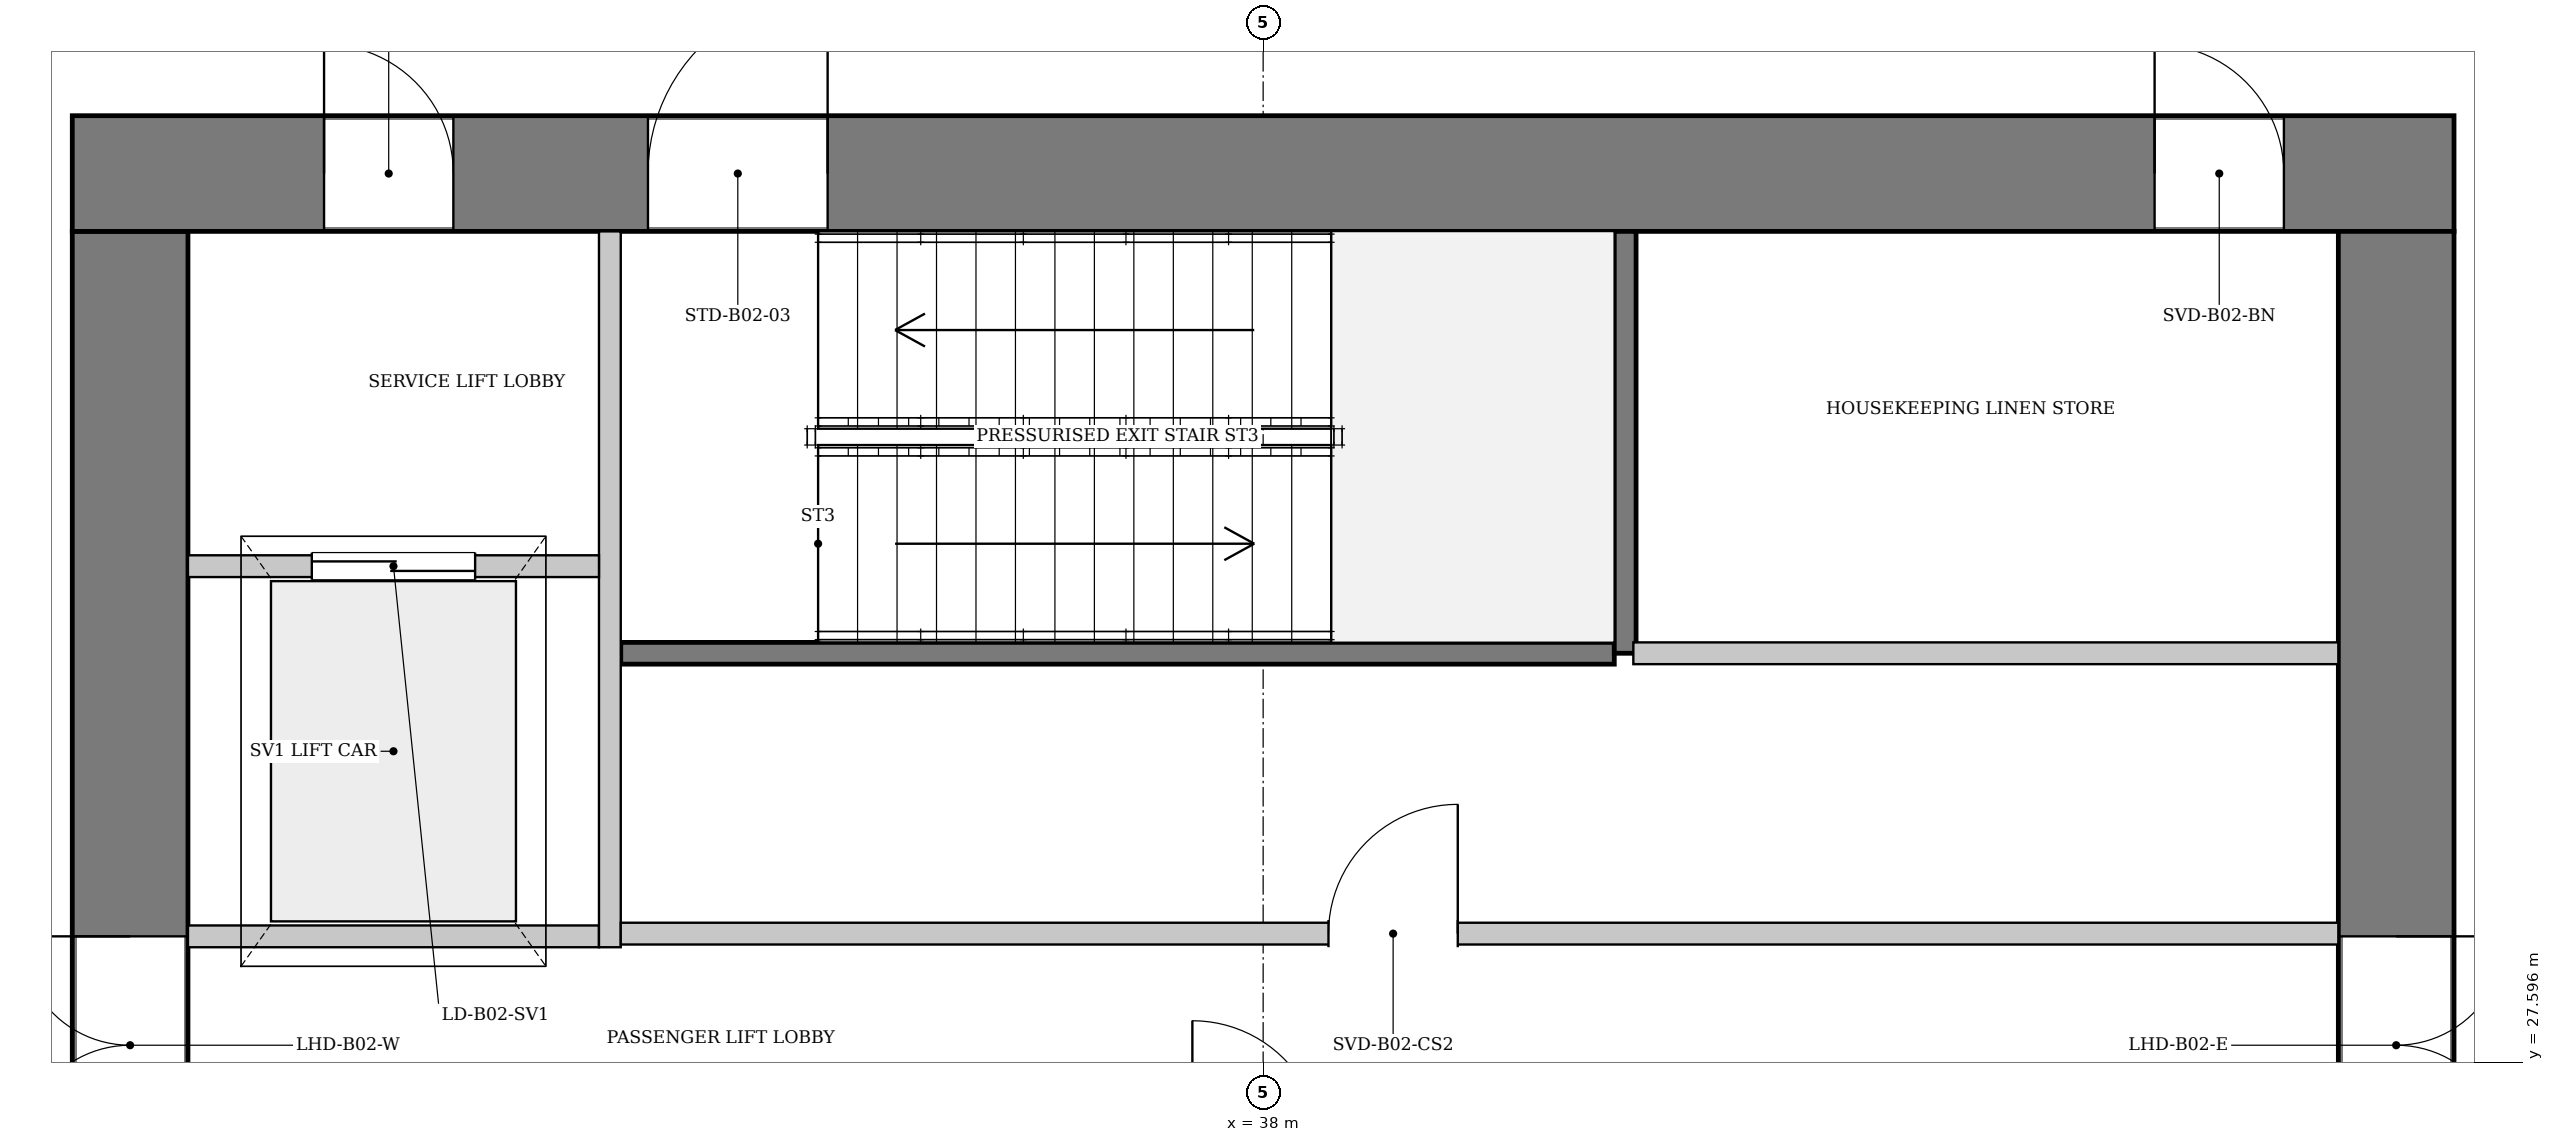
"""IFC4 building model, lengths in metres.
Left out: names, types, materials, properties, quantities, classifications, styles, units other than length and angle.
Written with IfcOpenShell. Run it as: python <this file> out.ifc"""

import sys

from ifc_helpers import new_model, si_unit, direction, frame, frame_2d, origin, place, context, subcontext, project, spatial, rectangle, extrude, source, transform, mapped, element, fill, save


model = new_model("IFC4")
c1 = context("Model", 3, precision=1e-05, world=origin(), true_north=direction((0.0, 1.0)))
c2 = subcontext(c1, "Body", "Model", "MODEL_VIEW")
j1 = project(units=[si_unit("LENGTHUNIT", "METRE"), si_unit("PLANEANGLEUNIT", "RADIAN")], contexts=[c1])
p1 = place(None, origin())
s1 = spatial("IfcSite", under=j1, at=p1, CompositionType="ELEMENT")
p2 = place(p1, origin())
s2 = spatial("IfcBuilding", under=s1, at=p2, CompositionType="ELEMENT")
p3 = place(p2, frame((0.0, 0.0, -9.6)))
s3 = spatial("IfcBuildingStorey", under=s2, at=p3, CompositionType="ELEMENT", Elevation=-9.6)
p4 = place(p3, frame((29.675, 19.5, 0.0), z_axis=(0.0, 0.0, 1.0), x_axis=(0.0, 1.0, 0.0)))
e1 = element("IfcWall", 1, at=p4, inside=s3, PredefinedType="SHEAR", context=c2, shape_type="SweptSolid", body=[
    extrude(rectangle(XDim=14.2, YDim=0.85, at=frame_2d((7.1, 0.0))), origin(), (0.0, 0.0, 1.0), 4.45),
])
p5 = place(p4, frame((7.42, 0.0, 0.0)))
e2 = element("IfcOpeningElement", 2, at=p5, cuts=e1, PredefinedType="OPENING", context=c2, shape_type="SweptSolid", body=[
    extrude(rectangle(XDim=1.6, YDim=2.2, at=frame_2d((0.8, 1.1))), frame((0.0, 0.435, 0.0), z_axis=(0.0, -1.0, 0.0), x_axis=(1.0, 0.0, 0.0)), (0.0, 0.0, 1.0), 0.87),
])
p6 = place(p3, frame((29.25, 34.125, 0.0), z_axis=(0.0, 0.0, 1.0), x_axis=(1.0, 0.0, 0.0)))
e3 = element("IfcWall", 3, at=p6, inside=s3, PredefinedType="SHEAR", context=c2, shape_type="SweptSolid", body=[
    extrude(rectangle(XDim=17.5, YDim=0.85, at=frame_2d((8.75, 0.0))), origin(), (0.0, 0.0, 1.0), 4.45),
])
p7 = place(p6, frame((1.85, 0.0, 0.0)))
e4 = element("IfcOpeningElement", 4, at=p7, cuts=e3, PredefinedType="OPENING", context=c2, shape_type="SweptSolid", body=[
    extrude(rectangle(XDim=0.95, YDim=2.1, at=frame_2d((0.475, 1.05))), frame((0.0, 0.435, 0.0), z_axis=(0.0, -1.0, 0.0), x_axis=(1.0, 0.0, 0.0)), (0.0, 0.0, 1.0), 0.87),
])
p8 = place(p6, frame((4.23, 0.0, 0.0)))
e5 = element("IfcOpeningElement", 5, at=p8, cuts=e3, PredefinedType="OPENING", context=c2, shape_type="SweptSolid", body=[
    extrude(rectangle(XDim=1.32, YDim=2.2, at=frame_2d((0.66, 1.1))), frame((0.0, 0.435, 0.0), z_axis=(0.0, -1.0, 0.0), x_axis=(1.0, 0.0, 0.0)), (0.0, 0.0, 1.0), 0.87),
])
p9 = place(p6, frame((15.3, 0.0, 0.0)))
e6 = element("IfcOpeningElement", 6, at=p9, cuts=e3, PredefinedType="OPENING", context=c2, shape_type="SweptSolid", body=[
    extrude(rectangle(XDim=0.95, YDim=2.1, at=frame_2d((0.475, 1.05))), frame((0.0, 0.435, 0.0), z_axis=(0.0, -1.0, 0.0), x_axis=(1.0, 0.0, 0.0)), (0.0, 0.0, 1.0), 0.87),
])
p10 = place(p3, frame((46.325, 33.7, 0.0), z_axis=(0.0, 0.0, 1.0), x_axis=(0.0, -1.0, 0.0)))
e7 = element("IfcWall", 7, at=p10, inside=s3, PredefinedType="SHEAR", context=c2, shape_type="SweptSolid", body=[
    extrude(rectangle(XDim=14.2, YDim=0.85, at=frame_2d((7.1, 0.0))), origin(), (0.0, 0.0, 1.0), 4.45),
])
p11 = place(p10, frame((5.18, 0.0, 0.0)))
e8 = element("IfcOpeningElement", 8, at=p11, cuts=e7, PredefinedType="OPENING", context=c2, shape_type="SweptSolid", body=[
    extrude(rectangle(XDim=1.6, YDim=2.2, at=frame_2d((0.8, 1.1))), frame((0.0, 0.435, 0.0), z_axis=(0.0, -1.0, 0.0), x_axis=(1.0, 0.0, 0.0)), (0.0, 0.0, 1.0), 0.87),
])
p12 = place(p3, frame((33.28, 30.6, 0.0), z_axis=(0.0, 0.0, 1.0), x_axis=(1.0, 0.0, 0.0)))
e9 = element("IfcWall", 9, at=p12, inside=s3, PredefinedType="PARTITIONING", context=c2, shape_type="SweptSolid", body=[
    extrude(rectangle(XDim=7.3, YDim=0.16, at=frame_2d((3.65, 0.0))), origin(), (0.0, 0.0, 1.0), 4.45),
])
p13 = place(p3, frame((40.66, 30.6, 0.0), z_axis=(0.0, 0.0, 1.0), x_axis=(0.0, 1.0, 0.0)))
e10 = element("IfcWall", 10, at=p13, inside=s3, PredefinedType="PARTITIONING", context=c2, shape_type="SweptSolid", body=[
    extrude(rectangle(XDim=3.1, YDim=0.16, at=frame_2d((1.55, 0.0))), origin(), (0.0, 0.0, 1.0), 4.45),
])
p14 = place(p3, frame((30.1, 28.52, 0.0), z_axis=(0.0, 0.0, 1.0), x_axis=(1.0, 0.0, 0.0)))
e11 = element("IfcWall", 11, at=p14, inside=s3, PredefinedType="PARTITIONING", context=c2, shape_type="SweptSolid", body=[
    extrude(rectangle(XDim=3.02, YDim=0.16, at=frame_2d((1.51, 0.0))), origin(), (0.0, 0.0, 1.0), 4.45),
])
p15 = place(p3, frame((33.2, 28.44, 0.0), z_axis=(0.0, 0.0, 1.0), x_axis=(0.0, 1.0, 0.0)))
e12 = element("IfcWall", 12, at=p15, inside=s3, PredefinedType="PARTITIONING", context=c2, shape_type="SweptSolid", body=[
    extrude(rectangle(XDim=5.26, YDim=0.16, at=frame_2d((2.63, 0.0))), origin(), (0.0, 0.0, 1.0), 4.45),
])
p16 = place(p3, frame((30.1, 31.24, 0.0), z_axis=(0.0, 0.0, 1.0), x_axis=(1.0, 0.0, 0.0)))
e13 = element("IfcWall", 13, at=p16, inside=s3, PredefinedType="PARTITIONING", context=c2, shape_type="SweptSolid", body=[
    extrude(rectangle(XDim=3.02, YDim=0.16, at=frame_2d((1.51, 0.0))), origin(), (0.0, 0.0, 1.0), 4.45),
])
p17 = place(p16, frame((0.91, 0.0, 0.0)))
e14 = element("IfcOpeningElement", 14, at=p17, cuts=e13, PredefinedType="OPENING", context=c2, shape_type="SweptSolid", body=[
    extrude(rectangle(XDim=1.2, YDim=2.2, at=frame_2d((0.6, 1.1))), frame((0.0, 0.09, 0.0), z_axis=(0.0, -1.0, 0.0), x_axis=(1.0, 0.0, 0.0)), (0.0, 0.0, 1.0), 0.18),
])
p18 = place(p3, frame((33.28, 28.54, 0.0), z_axis=(0.0, 0.0, 1.0), x_axis=(1.0, 0.0, 0.0)))
e15 = element("IfcWall", 15, at=p18, inside=s3, PredefinedType="PARTITIONING", context=c2, shape_type="SweptSolid", body=[
    extrude(rectangle(XDim=12.62, YDim=0.16, at=frame_2d((6.31, 0.0))), origin(), (0.0, 0.0, 1.0), 4.45),
])
p19 = place(p18, frame((5.2, 0.0, 0.0)))
e16 = element("IfcOpeningElement", 16, at=p19, cuts=e15, PredefinedType="OPENING", context=c2, shape_type="SweptSolid", body=[
    extrude(rectangle(XDim=0.95, YDim=2.1, at=frame_2d((0.475, 1.05))), frame((0.0, 0.09, 0.0), z_axis=(0.0, -1.0, 0.0), x_axis=(1.0, 0.0, 0.0)), (0.0, 0.0, 1.0), 0.18),
])
p20 = place(p3, frame((40.72, 30.6, 0.0), z_axis=(0.0, 0.0, 1.0), x_axis=(1.0, 0.0, 0.0)))
e17 = element("IfcWall", 17, at=p20, inside=s3, PredefinedType="PARTITIONING", context=c2, shape_type="SweptSolid", body=[
    extrude(rectangle(XDim=5.18, YDim=0.16, at=frame_2d((2.59, 0.0))), origin(), (0.0, 0.0, 1.0), 4.45),
])
m1 = source(origin(), c2, "Body", "SweptSolid", [
    extrude(rectangle(XDim=1.6, YDim=2.2, at=frame_2d((0.8, 1.1))), frame((0.0, 0.025, 0.0), z_axis=(0.0, -1.0, 0.0), x_axis=(1.0, 0.0, 0.0)), (0.0, 0.0, 1.0), 0.05),
])
p21 = place(p5, origin())
e18 = element("IfcDoor", 18, at=p21, inside=s3, OperationType="DOUBLE_DOOR_SINGLE_SWING", PredefinedType="DOOR", context=c2, shape_type="MappedRepresentation", body=[
    mapped(m1, transform((0.0, 0.0, 0.0), x_axis=(1.0, 0.0, 0.0), y_axis=(0.0, 1.0, 0.0), z_axis=(0.0, 0.0, 1.0), scale=1.0)),
])
fill(e2, e18)
m2 = source(origin(), c2, "Body", "SweptSolid", [
    extrude(rectangle(XDim=0.95, YDim=2.1, at=frame_2d((0.475, 1.05))), frame((0.0, 0.025, 0.0), z_axis=(0.0, -1.0, 0.0), x_axis=(1.0, 0.0, 0.0)), (0.0, 0.0, 1.0), 0.05),
])
p22 = place(p7, origin())
e19 = element("IfcDoor", 19, at=p22, inside=s3, OperationType="SINGLE_SWING_LEFT", PredefinedType="DOOR", context=c2, shape_type="MappedRepresentation", body=[
    mapped(m2, transform((0.0, 0.0, 0.0), x_axis=(1.0, 0.0, 0.0), y_axis=(0.0, 1.0, 0.0), z_axis=(0.0, 0.0, 1.0), scale=1.0)),
])
fill(e4, e19)
m3 = source(origin(), c2, "Body", "SweptSolid", [
    extrude(rectangle(XDim=1.32, YDim=2.2, at=frame_2d((0.66, 1.1))), frame((0.0, 0.025, 0.0), z_axis=(0.0, -1.0, 0.0), x_axis=(1.0, 0.0, 0.0)), (0.0, 0.0, 1.0), 0.05),
])
p23 = place(p8, origin())
e20 = element("IfcDoor", 20, at=p23, inside=s3, OperationType="SINGLE_SWING_RIGHT", PredefinedType="DOOR", context=c2, shape_type="MappedRepresentation", body=[
    mapped(m3, transform((0.0, 0.0, 0.0), x_axis=(1.0, 0.0, 0.0), y_axis=(0.0, 1.0, 0.0), z_axis=(0.0, 0.0, 1.0), scale=1.0)),
])
fill(e5, e20)
p24 = place(p11, origin())
e21 = element("IfcDoor", 21, at=p24, inside=s3, OperationType="DOUBLE_DOOR_SINGLE_SWING", PredefinedType="DOOR", context=c2, shape_type="MappedRepresentation", body=[
    mapped(m1, transform((0.0, 0.0, 0.0), x_axis=(1.0, 0.0, 0.0), y_axis=(0.0, 1.0, 0.0), z_axis=(0.0, 0.0, 1.0), scale=1.0)),
])
fill(e8, e21)
m4 = source(origin(), c2, "Body", "SweptSolid", [
    extrude(rectangle(XDim=1.2, YDim=2.2, at=frame_2d((0.6, 1.1))), frame((0.0, 0.025, 0.0), z_axis=(0.0, -1.0, 0.0), x_axis=(1.0, 0.0, 0.0)), (0.0, 0.0, 1.0), 0.05),
])
p25 = place(p17, origin())
e22 = element("IfcDoor", 22, at=p25, inside=s3, OperationType="DOUBLE_DOOR_SLIDING", PredefinedType="DOOR", context=c2, shape_type="MappedRepresentation", body=[
    mapped(m4, transform((0.0, 0.0, 0.0), x_axis=(1.0, 0.0, 0.0), y_axis=(0.0, 1.0, 0.0), z_axis=(0.0, 0.0, 1.0), scale=1.0)),
])
fill(e14, e22)
p26 = place(p19, origin())
e23 = element("IfcDoor", 23, at=p26, inside=s3, OperationType="SINGLE_SWING_RIGHT", PredefinedType="DOOR", context=c2, shape_type="MappedRepresentation", body=[
    mapped(m2, transform((0.0, 0.0, 0.0), x_axis=(1.0, 0.0, 0.0), y_axis=(0.0, 1.0, 0.0), z_axis=(0.0, 0.0, 1.0), scale=1.0)),
])
fill(e16, e23)
p27 = place(p9, origin())
e24 = element("IfcDoor", 24, at=p27, inside=s3, OperationType="SINGLE_SWING_LEFT", PredefinedType="DOOR", context=c2, shape_type="MappedRepresentation", body=[
    mapped(m2, transform((0.0, 0.0, 0.0), x_axis=(1.0, 0.0, 0.0), y_axis=(0.0, 1.0, 0.0), z_axis=(0.0, 0.0, 1.0), scale=1.0)),
])
fill(e6, e24)
save(model, sys.argv[1])
